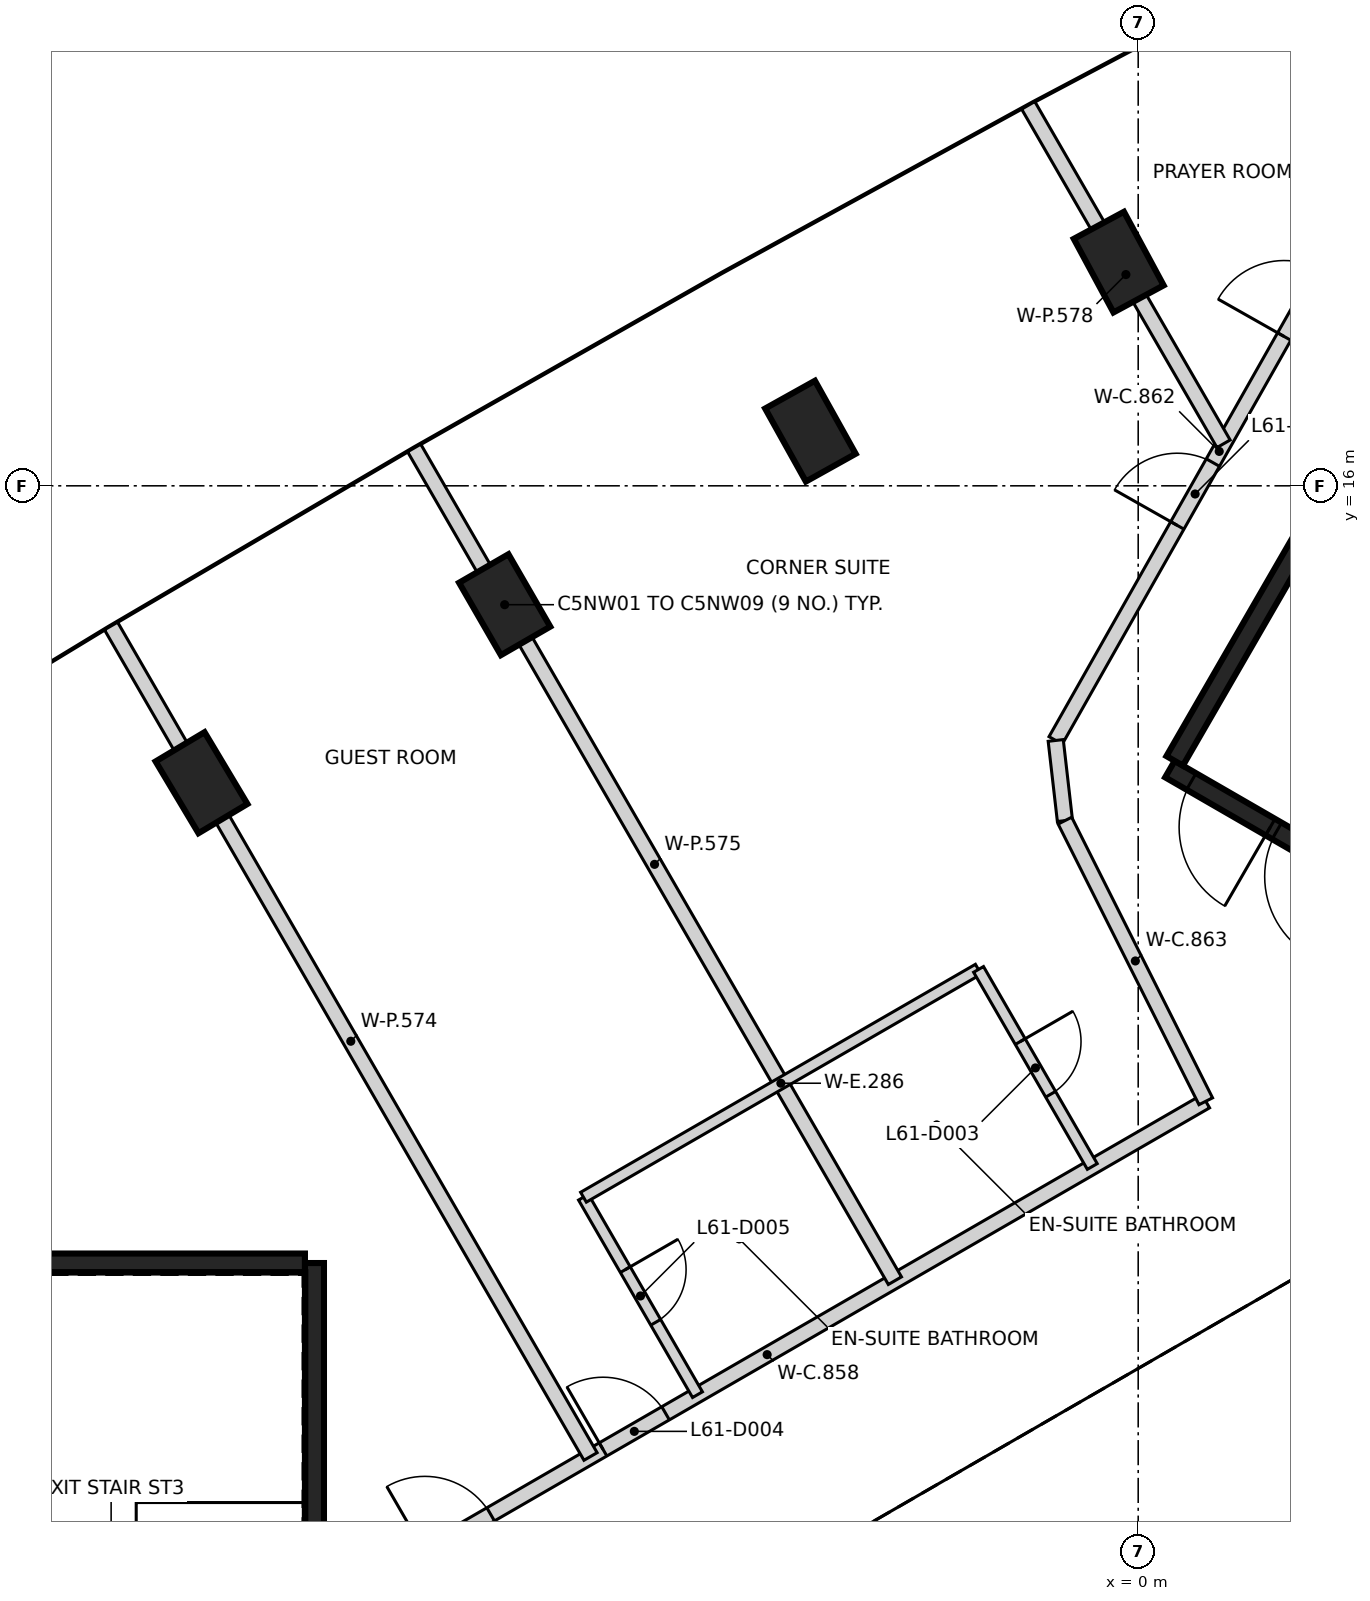
"""IFC4 building model, lengths in metres.
Left out: names, types, materials, properties, quantities, classifications, styles, units other than length and angle.
Written with IfcOpenShell. Run it as: python <this file> out.ifc"""

import sys

from ifc_helpers import new_model, si_unit, direction, frame, frame_2d, origin, origin_2d, place, context, subcontext, project, spatial, rectangle, extrude, element, fill, save


model = new_model("IFC4")
c1 = context("Model", 3, precision=1e-05, world=origin(), true_north=direction((0.0, 1.0)))
c2 = subcontext(c1, "Body", "Model", "MODEL_VIEW")
j1 = project(units=[si_unit("LENGTHUNIT", "METRE"), si_unit("PLANEANGLEUNIT", "RADIAN")], contexts=[c1])
p1 = place(None, origin())
s1 = spatial("IfcSite", under=j1, at=p1, CompositionType="ELEMENT")
p2 = place(p1, origin())
s2 = spatial("IfcBuilding", under=s1, at=p2, CompositionType="ELEMENT")
p3 = place(p2, frame((0.0, 0.0, 243.0)))
s3 = spatial("IfcBuildingStorey", under=s2, at=p3, CompositionType="ELEMENT", Elevation=243.0)
for number, where, z_axis, x_axis in (
    (1, (-0.256, 18.943, -0.35), (0.0, 0.0, 1.0), (-0.475, 0.88, 0.0)),
    (2, (-4.312, 16.719, -0.35), (0.0, 0.0, 1.0), (-0.487, 0.873, 0.0)),
    (3, (-8.335, 14.436, -0.35), (0.0, 0.0, 1.0), (-0.5, 0.866, 0.0)),
    (4, (-12.323, 12.094, -0.35), (0.0, 0.0, 1.0), (-0.513, 0.858, 0.0)),
):
    element("IfcColumn", number, at=place(p3, frame(where, z_axis=z_axis, x_axis=x_axis)), inside=s3, PredefinedType="COLUMN", context=c2, shape_type="SweptSolid", body=[
        extrude(rectangle(XDim=1.1, YDim=0.75, at=origin_2d()), origin(), (0.0, 0.0, 1.0), 3.6),
    ])
p4 = place(p3, frame((-10.837, 5.775, 0.0), z_axis=(0.0, 0.0, 1.0), x_axis=(0.0, -1.0, 0.0)))
e5 = element("IfcWall", 5, at=p4, inside=s3, PredefinedType="SHEAR", context=c2, shape_type="SweptSolid", body=[
    extrude(rectangle(XDim=11.55, YDim=0.25, at=frame_2d((5.775, 0.0))), origin(), (0.0, 0.0, 1.0), 3.25),
])
p5 = place(p4, frame((10.025, 0.0, 0.0)))
e6 = element("IfcOpeningElement", 6, at=p5, cuts=e5, PredefinedType="OPENING", context=c2, shape_type="SweptSolid", body=[
    extrude(rectangle(XDim=1.2, YDim=2.1, at=frame_2d((0.6, 1.05))), frame((0.0, 0.135, 0.0), z_axis=(0.0, -1.0, 0.0), x_axis=(1.0, 0.0, 0.0)), (0.0, 0.0, 1.0), 0.27),
])
p6 = place(p4, frame((8.725, 0.0, 0.0)))
e7 = element("IfcOpeningElement", 7, at=p6, cuts=e5, PredefinedType="OPENING", context=c2, shape_type="SweptSolid", body=[
    extrude(rectangle(XDim=1.2, YDim=2.1, at=frame_2d((0.6, 1.05))), frame((0.0, 0.135, 0.0), z_axis=(0.0, -1.0, 0.0), x_axis=(1.0, 0.0, 0.0)), (0.0, 0.0, 1.0), 0.27),
])
p7 = place(p3, frame((-16.472, 5.775, 0.0), z_axis=(0.0, 0.0, 1.0), x_axis=(1.0, 0.0, 0.0)))
e8 = element("IfcWall", 8, at=p7, inside=s3, PredefinedType="SHEAR", context=c2, shape_type="SweptSolid", body=[
    extrude(rectangle(XDim=5.51, YDim=0.25, at=frame_2d((2.755, 0.0))), origin(), (0.0, 0.0, 1.0), 3.25),
])
p8 = place(p3, frame((10.42, 6.498, 0.0), z_axis=(0.0, 0.0, 1.0), x_axis=(-0.866021906294, 0.500006057782, 0.0)))
e9 = element("IfcWall", 9, at=p8, inside=s3, PredefinedType="SHEAR", context=c2, shape_type="SweptSolid", body=[
    extrude(rectangle(XDim=11.55, YDim=0.25, at=frame_2d((5.775, 0.0))), origin(), (0.0, 0.0, 1.0), 3.25),
])
p9 = place(p8, frame((10.025, 0.0, 0.0)))
e10 = element("IfcOpeningElement", 10, at=p9, cuts=e9, PredefinedType="OPENING", context=c2, shape_type="SweptSolid", body=[
    extrude(rectangle(XDim=1.2, YDim=2.1, at=frame_2d((0.6, 1.05))), frame((0.0, 0.135, 0.0), z_axis=(0.0, -1.0, 0.0), x_axis=(1.0, 0.0, 0.0)), (0.0, 0.0, 1.0), 0.27),
])
p10 = place(p8, frame((8.725, 0.0, 0.0)))
e11 = element("IfcOpeningElement", 11, at=p10, cuts=e9, PredefinedType="OPENING", context=c2, shape_type="SweptSolid", body=[
    extrude(rectangle(XDim=1.2, YDim=2.1, at=frame_2d((0.6, 1.05))), frame((0.0, 0.135, 0.0), z_axis=(0.0, -1.0, 0.0), x_axis=(1.0, 0.0, 0.0)), (0.0, 0.0, 1.0), 0.27),
])
p11 = place(p3, frame((0.48, 12.381, 0.0), z_axis=(0.0, 0.0, 1.0), x_axis=(0.49999885962, 0.866026062182, 0.0)))
e12 = element("IfcWall", 12, at=p11, inside=s3, PredefinedType="SHEAR", context=c2, shape_type="SweptSolid", body=[
    extrude(rectangle(XDim=5.225, YDim=0.25, at=frame_2d((2.612, 0.0))), origin(), (0.0, 0.0, 1.0), 3.25),
])
p12 = place(p3, frame((-10.652, 1.237, 0.0), z_axis=(0.0, 0.0, 1.0), x_axis=(0.865922902183, 0.50017749597, 0.0)))
e13 = element("IfcWall", 13, at=p12, inside=s3, PredefinedType="PARTITIONING", context=c2, shape_type="SweptSolid", body=[
    extrude(rectangle(XDim=13.328, YDim=0.2, at=frame_2d((6.664, 0.0))), origin(), (0.0, 0.0, 1.0), 3.25),
])
p13 = place(p12, frame((4.171, 0.0, 0.0)))
e14 = element("IfcOpeningElement", 14, at=p13, cuts=e13, PredefinedType="OPENING", context=c2, shape_type="SweptSolid", body=[
    extrude(rectangle(XDim=0.95, YDim=2.1, at=frame_2d((0.475, 1.05))), frame((0.0, 0.11, 0.0), z_axis=(0.0, -1.0, 0.0), x_axis=(1.0, 0.0, 0.0)), (0.0, 0.0, 1.0), 0.22),
])
p14 = place(p12, frame((1.463, 0.0, 0.0)))
e15 = element("IfcOpeningElement", 15, at=p14, cuts=e13, PredefinedType="OPENING", context=c2, shape_type="SweptSolid", body=[
    extrude(rectangle(XDim=1.0, YDim=2.1, at=frame_2d((0.5, 1.05))), frame((0.0, 0.11, 0.0), z_axis=(0.0, -1.0, 0.0), x_axis=(1.0, 0.0, 0.0)), (0.0, 0.0, 1.0), 0.22),
])
p15 = place(p3, frame((-1.086, 12.651, 0.0), z_axis=(0.0, 0.0, 1.0), x_axis=(0.492590234691, 0.870261374925, 0.0)))
e16 = element("IfcWall", 16, at=p15, inside=s3, PredefinedType="PARTITIONING", context=c2, shape_type="SweptSolid", body=[
    extrude(rectangle(XDim=8.738, YDim=0.2, at=frame_2d((4.369, 0.0))), origin(), (0.0, 0.0, 1.0), 3.25),
])
p16 = place(p15, frame((6.105, 0.0, 0.0)))
e17 = element("IfcOpeningElement", 17, at=p16, cuts=e16, PredefinedType="OPENING", context=c2, shape_type="SweptSolid", body=[
    extrude(rectangle(XDim=1.0, YDim=2.1, at=frame_2d((0.5, 1.05))), frame((0.0, 0.11, 0.0), z_axis=(0.0, -1.0, 0.0), x_axis=(1.0, 0.0, 0.0)), (0.0, 0.0, 1.0), 0.22),
])
p17 = place(p15, frame((3.25, 0.0, 0.0)))
e18 = element("IfcOpeningElement", 18, at=p17, cuts=e16, PredefinedType="OPENING", context=c2, shape_type="SweptSolid", body=[
    extrude(rectangle(XDim=0.95, YDim=2.1, at=frame_2d((0.475, 1.05))), frame((0.0, 0.11, 0.0), z_axis=(0.0, -1.0, 0.0), x_axis=(1.0, 0.0, 0.0)), (0.0, 0.0, 1.0), 0.22),
])
p18 = place(p3, frame((-1.085, 12.65, 0.0), z_axis=(0.0, 0.0, 1.0), x_axis=(0.113812454263, -0.993502252264, 0.0)))
e19 = element("IfcWall", 19, at=p18, inside=s3, PredefinedType="PARTITIONING", context=c2, shape_type="SweptSolid", body=[
    extrude(rectangle(XDim=1.062, YDim=0.2, at=frame_2d((0.531, 0.0))), origin(), (0.0, 0.0, 1.0), 3.25),
])
p19 = place(p3, frame((-0.964, 11.595, 0.0), z_axis=(0.0, 0.0, 1.0), x_axis=(0.448584236569, -0.893740556706, 0.0)))
e20 = element("IfcWall", 20, at=p19, inside=s3, PredefinedType="PARTITIONING", context=c2, shape_type="SweptSolid", body=[
    extrude(rectangle(XDim=4.131, YDim=0.2, at=frame_2d((2.065, 0.0))), origin(), (0.0, 0.0, 1.0), 3.25),
])
p20 = place(p3, frame((-13.513, 14.156, 0.0), z_axis=(0.0, 0.0, 1.0), x_axis=(0.500012240511, -0.866018336607, 0.0)))
e21 = element("IfcWall", 21, at=p20, inside=s3, PredefinedType="PARTITIONING", context=c2, shape_type="SweptSolid", body=[
    extrude(rectangle(XDim=12.616, YDim=0.2, at=frame_2d((6.308, 0.0))), origin(), (0.0, 0.0, 1.0), 3.25),
])
p21 = place(p3, frame((-9.525, 16.498, 0.0), z_axis=(0.0, 0.0, 1.0), x_axis=(0.499979175972, -0.866037426209, 0.0)))
e22 = element("IfcWall", 22, at=p21, inside=s3, PredefinedType="PARTITIONING", context=c2, shape_type="SweptSolid", body=[
    extrude(rectangle(XDim=12.65, YDim=0.2, at=frame_2d((6.325, 0.0))), origin(), (0.0, 0.0, 1.0), 3.25),
])
p22 = place(p3, frame((-1.447, 21.005, 0.0), z_axis=(0.0, 0.0, 1.0), x_axis=(0.49988826685, -0.866089903339, 0.0)))
e23 = element("IfcWall", 23, at=p22, inside=s3, PredefinedType="PARTITIONING", context=c2, shape_type="SweptSolid", body=[
    extrude(rectangle(XDim=5.141, YDim=0.2, at=frame_2d((2.57, 0.0))), origin(), (0.0, 0.0, 1.0), 3.25),
])
p23 = place(p3, frame((-7.298, 6.641, 0.0), z_axis=(0.0, 0.0, 1.0), x_axis=(0.499990139034, -0.866031096941, 0.0)))
e24 = element("IfcWall", 24, at=p23, inside=s3, PredefinedType="PARTITIONING", context=c2, shape_type="SweptSolid", body=[
    extrude(rectangle(XDim=3.0, YDim=0.15, at=frame_2d((1.5, 0.0))), origin(), (0.0, 0.0, 1.0), 3.25),
])
p24 = place(p23, frame((1.1, 0.0, 0.0)))
e25 = element("IfcOpeningElement", 25, at=p24, cuts=e24, PredefinedType="OPENING", context=c2, shape_type="SweptSolid", body=[
    extrude(rectangle(XDim=0.8, YDim=2.1, at=frame_2d((0.4, 1.05))), frame((0.0, 0.085, 0.0), z_axis=(0.0, -1.0, 0.0), x_axis=(1.0, 0.0, 0.0)), (0.0, 0.0, 1.0), 0.17),
])
p25 = place(p3, frame((-7.298, 6.641, 0.0), z_axis=(0.0, 0.0, 1.0), x_axis=(0.865999837459, 0.50004427956, 0.0)))
e26 = element("IfcWall", 26, at=p25, inside=s3, PredefinedType="PARTITIONING", context=c2, shape_type="SweptSolid", body=[
    extrude(rectangle(XDim=5.998, YDim=0.15, at=frame_2d((2.999, 0.0))), origin(), (0.0, 0.0, 1.0), 3.25),
])
p26 = place(p3, frame((-2.1, 9.638, 0.0), z_axis=(0.0, 0.0, 1.0), x_axis=(0.499753046638, -0.866167935435, 0.0)))
e27 = element("IfcWall", 27, at=p26, inside=s3, PredefinedType="PARTITIONING", context=c2, shape_type="SweptSolid", body=[
    extrude(rectangle(XDim=2.994, YDim=0.15, at=frame_2d((1.497, 0.0))), origin(), (0.0, 0.0, 1.0), 3.25),
])
p27 = place(p26, frame((1.096, 0.0, 0.0)))
e28 = element("IfcOpeningElement", 28, at=p27, cuts=e27, PredefinedType="OPENING", context=c2, shape_type="SweptSolid", body=[
    extrude(rectangle(XDim=0.8, YDim=2.1, at=frame_2d((0.4, 1.05))), frame((0.0, 0.085, 0.0), z_axis=(0.0, -1.0, 0.0), x_axis=(1.0, 0.0, 0.0)), (0.0, 0.0, 1.0), 0.17),
])
p28 = place(p9, origin())
e29 = element("IfcDoor", 29, at=p28, inside=s3, OperationType="SINGLE_SWING_LEFT", PredefinedType="DOOR", context=c2, shape_type="SweptSolid", body=[
    extrude(rectangle(XDim=1.2, YDim=2.1, at=frame_2d((0.6, 1.05))), frame((0.0, 0.025, 0.0), z_axis=(0.0, -1.0, 0.0), x_axis=(1.0, 0.0, 0.0)), (0.0, 0.0, 1.0), 0.05),
])
fill(e10, e29)
p29 = place(p10, origin())
e30 = element("IfcDoor", 30, at=p29, inside=s3, OperationType="SINGLE_SWING_RIGHT", PredefinedType="DOOR", context=c2, shape_type="SweptSolid", body=[
    extrude(rectangle(XDim=1.2, YDim=2.1, at=frame_2d((0.6, 1.05))), frame((0.0, 0.025, 0.0), z_axis=(0.0, -1.0, 0.0), x_axis=(1.0, 0.0, 0.0)), (0.0, 0.0, 1.0), 0.05),
])
fill(e11, e30)
p30 = place(p16, origin())
e31 = element("IfcDoor", 31, at=p30, inside=s3, OperationType="SINGLE_SWING_LEFT", PredefinedType="DOOR", context=c2, shape_type="SweptSolid", body=[
    extrude(rectangle(XDim=1.0, YDim=2.1, at=frame_2d((0.5, 1.05))), frame((0.0, 0.025, 0.0), z_axis=(0.0, -1.0, 0.0), x_axis=(1.0, 0.0, 0.0)), (0.0, 0.0, 1.0), 0.05),
])
fill(e17, e31)
p31 = place(p17, origin())
e32 = element("IfcDoor", 32, at=p31, inside=s3, OperationType="SINGLE_SWING_LEFT", PredefinedType="DOOR", context=c2, shape_type="SweptSolid", body=[
    extrude(rectangle(XDim=0.95, YDim=2.1, at=frame_2d((0.475, 1.05))), frame((0.0, 0.025, 0.0), z_axis=(0.0, -1.0, 0.0), x_axis=(1.0, 0.0, 0.0)), (0.0, 0.0, 1.0), 0.05),
])
fill(e18, e32)
p32 = place(p27, origin())
e33 = element("IfcDoor", 33, at=p32, inside=s3, OperationType="SINGLE_SWING_LEFT", PredefinedType="DOOR", context=c2, shape_type="SweptSolid", body=[
    extrude(rectangle(XDim=0.8, YDim=2.1, at=frame_2d((0.4, 1.05))), frame((0.0, 0.025, 0.0), z_axis=(0.0, -1.0, 0.0), x_axis=(1.0, 0.0, 0.0)), (0.0, 0.0, 1.0), 0.05),
])
fill(e28, e33)
p33 = place(p13, origin())
e34 = element("IfcDoor", 34, at=p33, inside=s3, OperationType="SINGLE_SWING_LEFT", PredefinedType="DOOR", context=c2, shape_type="SweptSolid", body=[
    extrude(rectangle(XDim=0.95, YDim=2.1, at=frame_2d((0.475, 1.05))), frame((0.0, 0.025, 0.0), z_axis=(0.0, -1.0, 0.0), x_axis=(1.0, 0.0, 0.0)), (0.0, 0.0, 1.0), 0.05),
])
fill(e14, e34)
p34 = place(p24, origin())
e35 = element("IfcDoor", 35, at=p34, inside=s3, OperationType="SINGLE_SWING_LEFT", PredefinedType="DOOR", context=c2, shape_type="SweptSolid", body=[
    extrude(rectangle(XDim=0.8, YDim=2.1, at=frame_2d((0.4, 1.05))), frame((0.0, 0.025, 0.0), z_axis=(0.0, -1.0, 0.0), x_axis=(1.0, 0.0, 0.0)), (0.0, 0.0, 1.0), 0.05),
])
fill(e25, e35)
p35 = place(p14, origin())
e36 = element("IfcDoor", 36, at=p35, inside=s3, OperationType="SINGLE_SWING_LEFT", PredefinedType="DOOR", context=c2, shape_type="SweptSolid", body=[
    extrude(rectangle(XDim=1.0, YDim=2.1, at=frame_2d((0.5, 1.05))), frame((0.0, 0.025, 0.0), z_axis=(0.0, -1.0, 0.0), x_axis=(1.0, 0.0, 0.0)), (0.0, 0.0, 1.0), 0.05),
])
fill(e15, e36)
save(model, sys.argv[1])
